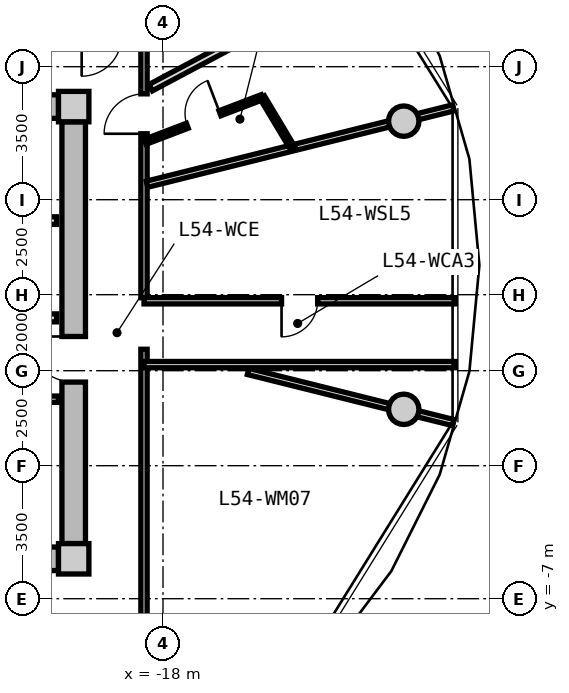
"""IFC4 building model, lengths in metres.
Left out: names, types, materials, properties, quantities, classifications, styles, units other than length and angle.
Written with IfcOpenShell. Run it as: python <this file> out.ifc"""

import sys

from ifc_helpers import new_model, si_unit, direction, frame, frame_2d, origin, origin_2d, place, context, subcontext, project, spatial, rectangle, circle, extrude, source, transform, mapped, element, fill, save


model = new_model("IFC4")
c1 = context("Model", 3, precision=1e-05, world=origin(), true_north=direction((0.0, 1.0)))
c2 = subcontext(c1, "Body", "Model", "MODEL_VIEW")
j1 = project(units=[si_unit("LENGTHUNIT", "METRE"), si_unit("PLANEANGLEUNIT", "RADIAN")], contexts=[c1])
p1 = place(None, origin())
s1 = spatial("IfcSite", under=j1, at=p1, CompositionType="ELEMENT")
p2 = place(p1, origin())
s2 = spatial("IfcBuilding", under=s1, at=p2, CompositionType="ELEMENT")
p3 = place(p2, frame((0.0, 0.0, 173.95)))
s3 = spatial("IfcBuildingStorey", under=s2, at=p3, CompositionType="ELEMENT", Elevation=173.95)
m1 = source(origin(), c2, "Body", "SweptSolid", [
    extrude(rectangle(XDim=0.8, YDim=0.8, at=origin_2d()), origin(), (0.0, 0.0, 1.0), 3.05),
])
for number, where, z_axis, x_axis in (
    (1, (-20.35, -5.95, 0.0), (0.0, 0.0, 1.0), (1.0, 0.0, 0.0)),
    (2, (-20.35, 5.95, 0.0), (0.0, 0.0, 1.0), (1.0, 0.0, 0.0)),
):
    element("IfcColumn", number, at=place(p3, frame(where, z_axis=z_axis, x_axis=x_axis)), inside=s3, PredefinedType="COLUMN", context=c2, shape_type="MappedRepresentation", body=[
        mapped(m1, transform((0.0, 0.0, 0.0), x_axis=(1.0, 0.0, 0.0), y_axis=(0.0, 1.0, 0.0), z_axis=(0.0, 0.0, 1.0), scale=1.0)),
    ])
m2 = source(origin(), c2, "Body", "SweptSolid", [
    extrude(rectangle(XDim=14.5, YDim=0.62, at=frame_2d((7.25, 0.0))), origin(), (0.0, 0.0, 1.0), 2.81),
])
for number, where, z_axis, x_axis in (
    (3, (-35.25, 5.95, 0.0), (0.0, 0.0, 1.0), (1.0, 0.0, 0.0)),
    (4, (-20.75, -5.95, 0.0), (0.0, 0.0, 1.0), (-1.0, 0.0, 0.0)),
):
    element("IfcWall", number, at=place(p3, frame(where, z_axis=z_axis, x_axis=x_axis)), inside=s3, PredefinedType="SHEAR", context=c2, shape_type="MappedRepresentation", body=[
        mapped(m2, transform((0.0, 0.0, 0.0), x_axis=(1.0, 0.0, 0.0), y_axis=(0.0, 1.0, 0.0), z_axis=(0.0, 0.0, 1.0), scale=1.0)),
    ])
m3 = source(origin(), c2, "Body", "SweptSolid", [
    extrude(rectangle(XDim=11.1, YDim=0.62, at=frame_2d((5.55, 0.0))), origin(), (0.0, 0.0, 1.0), 2.81),
])
p4 = place(p3, frame((-20.35, 5.55, 0.0), z_axis=(0.0, 0.0, 1.0), x_axis=(0.0, -1.0, 0.0)))
e5 = element("IfcWall", 5, at=p4, inside=s3, PredefinedType="SHEAR", context=c2, shape_type="MappedRepresentation", body=[
    mapped(m3, transform((0.0, 0.0, 0.0), x_axis=(1.0, 0.0, 0.0), y_axis=(0.0, 1.0, 0.0), z_axis=(0.0, 0.0, 1.0), scale=1.0)),
])
p5 = place(p4, frame((5.65, 0.0, 0.0)))
e6 = element("IfcOpeningElement", 6, at=p5, cuts=e5, PredefinedType="OPENING", context=c2, shape_type="SweptSolid", body=[
    extrude(rectangle(XDim=1.2, YDim=2.15, at=frame_2d((0.6, 1.075))), frame((0.0, 0.32, 0.0), z_axis=(0.0, -1.0, 0.0), x_axis=(1.0, 0.0, 0.0)), (0.0, 0.0, 1.0), 0.64),
])
m4 = source(origin(), c2, "Body", "SweptSolid", [
    extrude(circle(Radius=0.4, at=origin_2d()), origin(), (0.0, 0.0, 1.0), 3.05),
])
for number, where, z_axis, x_axis in (
    (7, (-11.665, 5.567, 0.0), (0.0, 0.0, 1.0), (1.0, 0.0, 0.0)),
    (8, (-11.665, -2.016, 0.0), (0.0, 0.0, 1.0), (1.0, 0.0, 0.0)),
):
    element("IfcColumn", number, at=place(p3, frame(where, z_axis=z_axis, x_axis=x_axis)), inside=s3, PredefinedType="COLUMN", context=c2, shape_type="MappedRepresentation", body=[
        mapped(m4, transform((0.0, 0.0, 0.0), x_axis=(1.0, 0.0, 0.0), y_axis=(0.0, 1.0, 0.0), z_axis=(0.0, 0.0, 1.0), scale=1.0)),
    ])
m5 = source(origin(), c2, "Body", "SweptSolid", [
    extrude(rectangle(XDim=3.2, YDim=0.2, at=frame_2d((1.6, 0.0))), origin(), (0.0, 0.0, 1.0), 2.795),
])
p6 = place(p3, frame((-24.0, 2.95, 0.0), z_axis=(0.0, 0.0, 1.0), x_axis=(1.0, 0.0, 0.0)))
e9 = element("IfcWall", 9, at=p6, inside=s3, PredefinedType="PARTITIONING", context=c2, shape_type="MappedRepresentation", body=[
    mapped(m5, transform((0.0, 0.0, 0.0), x_axis=(1.0, 0.0, 0.0), y_axis=(0.0, 1.0, 0.0), z_axis=(0.0, 0.0, 1.0), scale=1.0)),
])
m6 = source(origin(), c2, "Body", "SweptSolid", [
    extrude(rectangle(XDim=6.66, YDim=0.21, at=frame_2d((3.33, 0.0))), origin(), (0.0, 0.0, 1.0), 2.795),
])
p7 = place(p3, frame((-27.46, 0.39, 0.0), z_axis=(0.0, 0.0, 1.0), x_axis=(1.0, 0.0, 0.0)))
e10 = element("IfcWall", 10, at=p7, inside=s3, PredefinedType="PARTITIONING", context=c2, shape_type="MappedRepresentation", body=[
    mapped(m6, transform((0.0, 0.0, 0.0), x_axis=(1.0, 0.0, 0.0), y_axis=(0.0, 1.0, 0.0), z_axis=(0.0, 0.0, 1.0), scale=1.0)),
])
p8 = place(p7, frame((1.0, 0.0, 0.0)))
e11 = element("IfcOpeningElement", 11, at=p8, cuts=e10, PredefinedType="OPENING", context=c2, shape_type="SweptSolid", body=[
    extrude(rectangle(XDim=1.2, YDim=2.15, at=frame_2d((0.6, 1.075))), frame((0.0, 0.115, 0.0), z_axis=(0.0, -1.0, 0.0), x_axis=(1.0, 0.0, 0.0)), (0.0, 0.0, 1.0), 0.23),
])
m7 = source(origin(), c2, "Body", "SweptSolid", [
    extrude(rectangle(XDim=2.7, YDim=0.165, at=frame_2d((1.35, 0.0))), origin(), (0.0, 0.0, 1.0), 2.795),
])
p9 = place(p3, frame((-23.45, -1.75, 0.0), z_axis=(0.0, 0.0, 1.0), x_axis=(1.0, 0.0, 0.0)))
e12 = element("IfcWall", 12, at=p9, inside=s3, PredefinedType="PARTITIONING", context=c2, shape_type="MappedRepresentation", body=[
    mapped(m7, transform((0.0, 0.0, 0.0), x_axis=(1.0, 0.0, 0.0), y_axis=(0.0, 1.0, 0.0), z_axis=(0.0, 0.0, 1.0), scale=1.0)),
])
p10 = place(p9, frame((0.85, 0.0, 0.0)))
e13 = element("IfcOpeningElement", 13, at=p10, cuts=e12, PredefinedType="OPENING", context=c2, shape_type="SweptSolid", body=[
    extrude(rectangle(XDim=0.925, YDim=2.1, at=frame_2d((0.462, 1.05))), frame((0.0, 0.093, 0.0), z_axis=(0.0, -1.0, 0.0), x_axis=(1.0, 0.0, 0.0)), (0.0, 0.0, 1.0), 0.185),
])
m8 = source(origin(), c2, "Body", "SweptSolid", [
    extrude(rectangle(XDim=6.88, YDim=0.165, at=frame_2d((3.44, 0.0))), origin(), (0.0, 0.0, 1.0), 2.795),
])
p11 = place(p3, frame((-18.5, 7.8, 0.0), z_axis=(0.0, 0.0, 1.0), x_axis=(0.0, -1.0, 0.0)))
e14 = element("IfcWall", 14, at=p11, inside=s3, PredefinedType="PARTITIONING", context=c2, shape_type="MappedRepresentation", body=[
    mapped(m8, transform((0.0, 0.0, 0.0), x_axis=(1.0, 0.0, 0.0), y_axis=(0.0, 1.0, 0.0), z_axis=(0.0, 0.0, 1.0), scale=1.0)),
])
p12 = place(p11, frame((1.515, 0.0, 0.0)))
e15 = element("IfcOpeningElement", 15, at=p12, cuts=e14, PredefinedType="OPENING", context=c2, shape_type="SweptSolid", body=[
    extrude(rectangle(XDim=1.05, YDim=2.15, at=frame_2d((0.525, 1.075))), frame((0.0, 0.093, 0.0), z_axis=(0.0, -1.0, 0.0), x_axis=(1.0, 0.0, 0.0)), (0.0, 0.0, 1.0), 0.185),
])
m9 = source(origin(), c2, "Body", "SweptSolid", [
    extrude(rectangle(XDim=7.365, YDim=0.165, at=frame_2d((3.682, 0.0))), origin(), (0.0, 0.0, 1.0), 2.795),
])
p13 = place(p3, frame((-18.5, -0.436, 0.0), z_axis=(0.0, 0.0, 1.0), x_axis=(0.0, -1.0, 0.0)))
e16 = element("IfcWall", 16, at=p13, inside=s3, PredefinedType="PARTITIONING", context=c2, shape_type="MappedRepresentation", body=[
    mapped(m9, transform((0.0, 0.0, 0.0), x_axis=(1.0, 0.0, 0.0), y_axis=(0.0, 1.0, 0.0), z_axis=(0.0, 0.0, 1.0), scale=1.0)),
])
m10 = source(origin(), c2, "Body", "SweptSolid", [
    extrude(rectangle(XDim=5.564, YDim=0.165, at=frame_2d((2.782, 0.0))), origin(), (0.0, 0.0, 1.0), 2.345),
])
p14 = place(p3, frame((-15.76, -1.02, 0.0), z_axis=(0.0, 0.0, 1.0), x_axis=(0.970315176167, -0.241843872984, 0.0)))
e17 = element("IfcWall", 17, at=p14, inside=s3, PredefinedType="PARTITIONING", context=c2, shape_type="MappedRepresentation", body=[
    mapped(m10, transform((0.0, 0.0, 0.0), x_axis=(1.0, 0.0, 0.0), y_axis=(0.0, 1.0, 0.0), z_axis=(0.0, 0.0, 1.0), scale=1.0)),
])
m11 = source(origin(), c2, "Body", "SweptSolid", [
    extrude(rectangle(XDim=8.305, YDim=0.165, at=frame_2d((4.153, 0.0))), origin(), (0.0, 0.0, 1.0), 2.345),
])
p15 = place(p3, frame((-18.42, 3.908, 0.0), z_axis=(0.0, 0.0, 1.0), x_axis=(0.970309994378, 0.241864662175, 0.0)))
e18 = element("IfcWall", 18, at=p15, inside=s3, PredefinedType="PARTITIONING", context=c2, shape_type="MappedRepresentation", body=[
    mapped(m11, transform((0.0, 0.0, 0.0), x_axis=(1.0, 0.0, 0.0), y_axis=(0.0, 1.0, 0.0), z_axis=(0.0, 0.0, 1.0), scale=1.0)),
])
m12 = source(origin(), c2, "Body", "SweptSolid", [
    extrude(rectangle(XDim=8.189, YDim=0.165, at=frame_2d((4.094, 0.0))), origin(), (0.0, 0.0, 1.0), 2.795),
])
p16 = place(p3, frame((-18.5, 0.84, 0.0), z_axis=(0.0, 0.0, 1.0), x_axis=(1.0, 0.0, 0.0)))
e19 = element("IfcWall", 19, at=p16, inside=s3, PredefinedType="PARTITIONING", context=c2, shape_type="MappedRepresentation", body=[
    mapped(m12, transform((0.0, 0.0, 0.0), x_axis=(1.0, 0.0, 0.0), y_axis=(0.0, 1.0, 0.0), z_axis=(0.0, 0.0, 1.0), scale=1.0)),
])
p17 = place(p16, frame((3.619, 0.0, 0.0)))
e20 = element("IfcOpeningElement", 20, at=p17, cuts=e19, PredefinedType="OPENING", context=c2, shape_type="SweptSolid", body=[
    extrude(rectangle(XDim=0.95, YDim=2.1, at=frame_2d((0.475, 1.05))), frame((0.0, 0.093, 0.0), z_axis=(0.0, -1.0, 0.0), x_axis=(1.0, 0.0, 0.0)), (0.0, 0.0, 1.0), 0.185),
])
p18 = place(p3, frame((-10.311, -0.84, 0.0), z_axis=(0.0, 0.0, 1.0), x_axis=(-1.0, 0.0, 0.0)))
e21 = element("IfcWall", 21, at=p18, inside=s3, PredefinedType="PARTITIONING", context=c2, shape_type="MappedRepresentation", body=[
    mapped(m12, transform((0.0, 0.0, 0.0), x_axis=(1.0, 0.0, 0.0), y_axis=(0.0, 1.0, 0.0), z_axis=(0.0, 0.0, 1.0), scale=1.0)),
])
m13 = source(origin(), c2, "Body", "SweptSolid", [
    extrude(rectangle(XDim=6.499, YDim=0.19, at=frame_2d((3.25, 0.0))), origin(), (0.0, 0.0, 1.0), 2.795),
])
p19 = place(p3, frame((-18.324, 6.449, 0.0), z_axis=(0.0, 0.0, 1.0), x_axis=(0.882715595921, 0.469907625729, 0.0)))
e22 = element("IfcWall", 22, at=p19, inside=s3, PredefinedType="PARTITIONING", context=c2, shape_type="MappedRepresentation", body=[
    mapped(m13, transform((0.0, 0.0, 0.0), x_axis=(1.0, 0.0, 0.0), y_axis=(0.0, 1.0, 0.0), z_axis=(0.0, 0.0, 1.0), scale=1.0)),
])
m14 = source(origin(), c2, "Body", "SweptSolid", [
    extrude(rectangle(XDim=3.295, YDim=0.14, at=frame_2d((1.647, 0.0))), origin(), (0.0, 0.0, 1.0), 2.795),
])
p20 = place(p3, frame((-18.47, 5.023, 0.0), z_axis=(0.0, 0.0, 1.0), x_axis=(0.934202224769, 0.356743890258, 0.0)))
e23 = element("IfcWall", 23, at=p20, inside=s3, PredefinedType="PARTITIONING", context=c2, shape_type="MappedRepresentation", body=[
    mapped(m14, transform((0.0, 0.0, 0.0), x_axis=(1.0, 0.0, 0.0), y_axis=(0.0, 1.0, 0.0), z_axis=(0.0, 0.0, 1.0), scale=1.0)),
])
p21 = place(p20, frame((1.188, 0.0, 0.0)))
e24 = element("IfcOpeningElement", 24, at=p21, cuts=e23, PredefinedType="OPENING", context=c2, shape_type="SweptSolid", body=[
    extrude(rectangle(XDim=0.92, YDim=2.1, at=frame_2d((0.46, 1.05))), frame((0.0, 0.08, 0.0), z_axis=(0.0, -1.0, 0.0), x_axis=(1.0, 0.0, 0.0)), (0.0, 0.0, 1.0), 0.16),
])
m15 = source(origin(), c2, "Body", "SweptSolid", [
    extrude(rectangle(XDim=1.558, YDim=0.14, at=frame_2d((0.779, 0.0))), origin(), (0.0, 0.0, 1.0), 2.795),
])
p22 = place(p3, frame((-15.392, 6.198, 0.0), z_axis=(0.0, 0.0, 1.0), x_axis=(0.513735221728, -0.85794878749, 0.0)))
e25 = element("IfcWall", 25, at=p22, inside=s3, PredefinedType="PARTITIONING", context=c2, shape_type="MappedRepresentation", body=[
    mapped(m15, transform((0.0, 0.0, 0.0), x_axis=(1.0, 0.0, 0.0), y_axis=(0.0, 1.0, 0.0), z_axis=(0.0, 0.0, 1.0), scale=1.0)),
])
m16 = source(origin(), c2, "Body", "SweptSolid", [
    extrude(rectangle(XDim=1.2, YDim=2.15, at=frame_2d((0.6, 1.075))), frame((0.0, 0.025, 0.0), z_axis=(0.0, -1.0, 0.0), x_axis=(1.0, 0.0, 0.0)), (0.0, 0.0, 1.0), 0.05),
])
p23 = place(p5, frame((1.2, 0.0, 0.0), z_axis=(0.0, 0.0, 1.0), x_axis=(-1.0, 0.0, 0.0)))
e26 = element("IfcDoor", 26, at=p23, inside=s3, OperationType="SINGLE_SWING_RIGHT", PredefinedType="DOOR", context=c2, shape_type="MappedRepresentation", body=[
    mapped(m16, transform((0.0, 0.0, 0.0), x_axis=(1.0, 0.0, 0.0), y_axis=(0.0, 1.0, 0.0), z_axis=(0.0, 0.0, 1.0), scale=1.0)),
])
fill(e6, e26)
m17 = source(origin(), c2, "Body", "SweptSolid", [
    extrude(rectangle(XDim=0.95, YDim=2.1, at=frame_2d((0.475, 1.05))), frame((0.0, 0.025, 0.0), z_axis=(0.0, -1.0, 0.0), x_axis=(1.0, 0.0, 0.0)), (0.0, 0.0, 1.0), 0.05),
])
p24 = place(p17, frame((0.95, 0.0, 0.0), z_axis=(0.0, 0.0, 1.0), x_axis=(-1.0, 0.0, 0.0)))
e27 = element("IfcDoor", 27, at=p24, inside=s3, OperationType="SINGLE_SWING_RIGHT", PredefinedType="DOOR", context=c2, shape_type="MappedRepresentation", body=[
    mapped(m17, transform((0.0, 0.0, 0.0), x_axis=(1.0, 0.0, 0.0), y_axis=(0.0, 1.0, 0.0), z_axis=(0.0, 0.0, 1.0), scale=1.0)),
])
fill(e20, e27)
m18 = source(origin(), c2, "Body", "SweptSolid", [
    extrude(rectangle(XDim=1.05, YDim=2.15, at=frame_2d((0.525, 1.075))), frame((0.0, 0.025, 0.0), z_axis=(0.0, -1.0, 0.0), x_axis=(1.0, 0.0, 0.0)), (0.0, 0.0, 1.0), 0.05),
])
p25 = place(p12, frame((1.05, 0.0, 0.0), z_axis=(0.0, 0.0, 1.0), x_axis=(-1.0, 0.0, 0.0)))
e28 = element("IfcDoor", 28, at=p25, inside=s3, OperationType="SINGLE_SWING_LEFT", PredefinedType="DOOR", context=c2, shape_type="MappedRepresentation", body=[
    mapped(m18, transform((0.0, 0.0, 0.0), x_axis=(1.0, 0.0, 0.0), y_axis=(0.0, 1.0, 0.0), z_axis=(0.0, 0.0, 1.0), scale=1.0)),
])
fill(e15, e28)
m19 = source(origin(), c2, "Body", "SweptSolid", [
    extrude(rectangle(XDim=0.92, YDim=2.1, at=frame_2d((0.46, 1.05))), frame((0.0, 0.025, 0.0), z_axis=(0.0, -1.0, 0.0), x_axis=(1.0, 0.0, 0.0)), (0.0, 0.0, 1.0), 0.05),
])
p26 = place(p21, origin())
e29 = element("IfcDoor", 29, at=p26, inside=s3, OperationType="SINGLE_SWING_RIGHT", PredefinedType="DOOR", context=c2, shape_type="MappedRepresentation", body=[
    mapped(m19, transform((0.0, 0.0, 0.0), x_axis=(1.0, 0.0, 0.0), y_axis=(0.0, 1.0, 0.0), z_axis=(0.0, 0.0, 1.0), scale=1.0)),
])
fill(e24, e29)
save(model, sys.argv[1])
